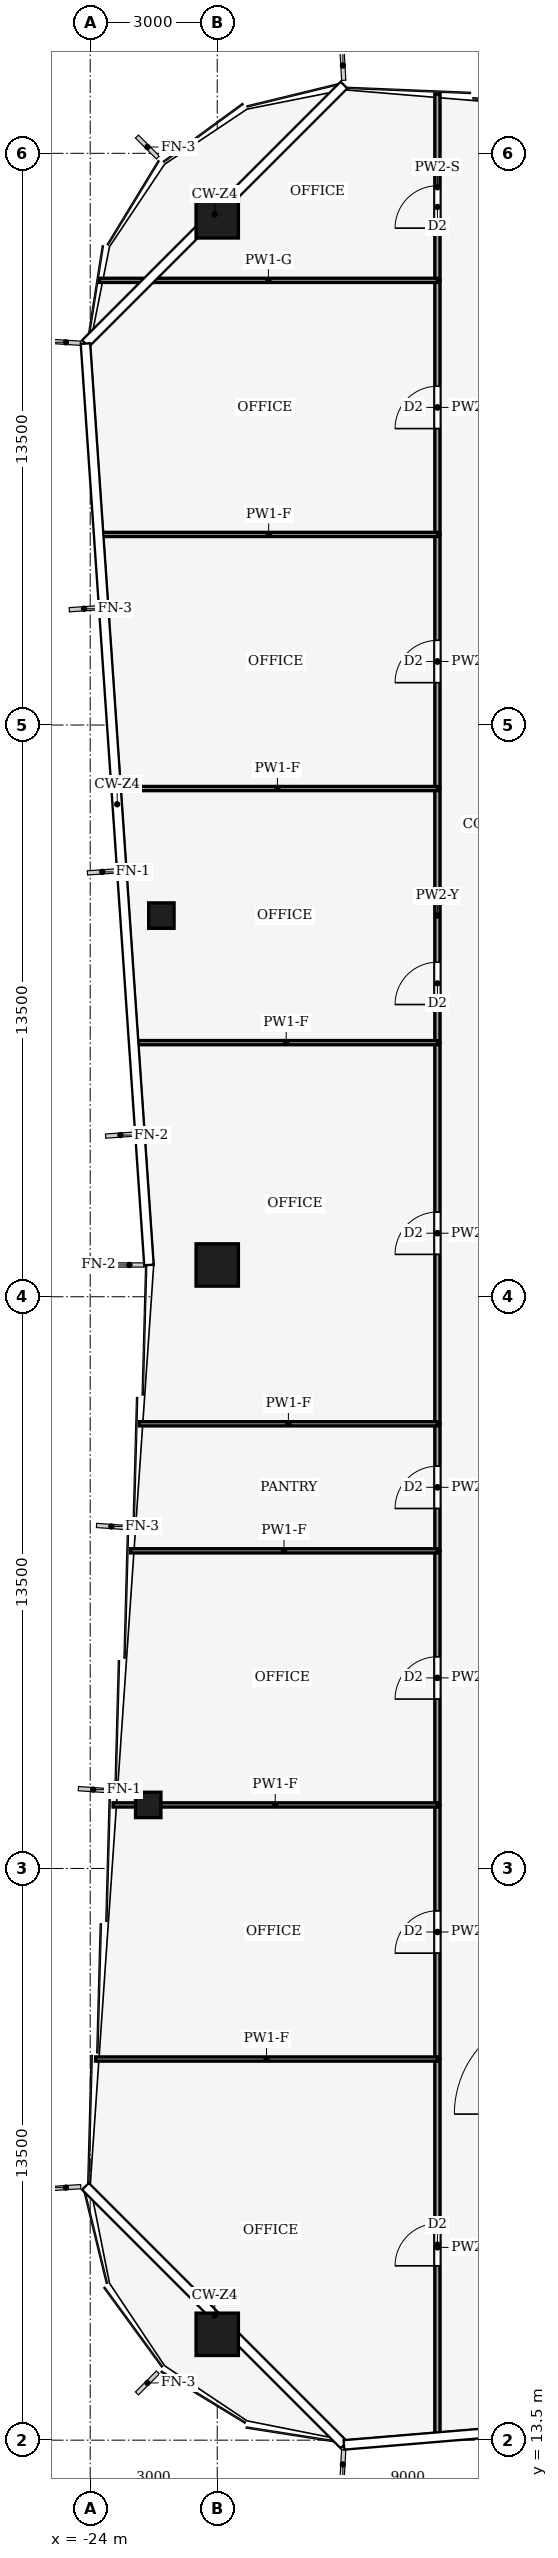
"""IFC4 building model, lengths in metres.
Left out: names, types, materials, properties, quantities, classifications, styles, units other than length and angle.
Written with IfcOpenShell. Run it as: python <this file> out.ifc"""

import sys

from ifc_helpers import new_model, si_unit, direction, frame, frame_2d, origin, origin_2d, place, context, subcontext, project, spatial, rectangle, hollow_rectangle, extrude, element, fill, save


model = new_model("IFC4")
c1 = context("Model", 3, precision=1e-05, world=origin(), true_north=direction((0.0, 1.0)))
c2 = subcontext(c1, "Body", "Model", "MODEL_VIEW")
j1 = project(units=[si_unit("LENGTHUNIT", "METRE"), si_unit("PLANEANGLEUNIT", "RADIAN")], contexts=[c1])
p1 = place(None, origin())
s1 = spatial("IfcSite", under=j1, at=p1, CompositionType="ELEMENT")
p2 = place(p1, origin())
s2 = spatial("IfcBuilding", under=s1, at=p2, CompositionType="ELEMENT")
p3 = place(p2, frame((0.0, 0.0, 262.0)))
s3 = spatial("IfcBuildingStorey", under=s2, at=p3, CompositionType="ELEMENT", Elevation=262.0)
for number, where, z_axis, x_axis in (
    (1, (-21.0, 66.0, 0.0), (0.0, 0.0, 1.0), (1.0, 0.0, 0.0)),
    (2, (-21.0, 16.0, 0.0), (0.0, 0.0, 1.0), (1.0, 0.0, 0.0)),
    (3, (-21.0, 41.25, 0.0), (0.0, 0.0, 1.0), (1.0, 0.0, 0.0)),
):
    element("IfcColumn", number, at=place(p3, frame(where, z_axis=z_axis, x_axis=x_axis)), inside=s3, PredefinedType="COLUMN", context=c2, shape_type="SweptSolid", body=[
        extrude(hollow_rectangle(XDim=1.0, YDim=1.0, WallThickness=0.045, at=origin_2d()), origin(), (0.0, 0.0, 1.0), 4.0),
    ])
for number, where, z_axis, x_axis in (
    (4, (-22.629, 28.5, 0.0), (0.0, 0.0, 1.0), (1.0, 0.0, 0.0)),
    (5, (-22.319, 49.5, 0.0), (0.0, 0.0, 1.0), (1.0, 0.0, 0.0)),
):
    element("IfcColumn", number, at=place(p3, frame(where, z_axis=z_axis, x_axis=x_axis)), inside=s3, PredefinedType="COLUMN", context=c2, shape_type="SweptSolid", body=[
        extrude(hollow_rectangle(XDim=0.6, YDim=0.6, WallThickness=0.025, at=origin_2d()), origin(), (0.0, 0.0, 1.0), 4.0),
    ])
p4 = place(p3, frame((-15.8, 13.603, 0.0), z_axis=(0.0, 0.0, 1.0), x_axis=(0.0, 1.0, 0.0)))
e6 = element("IfcWall", 6, at=p4, inside=s3, PredefinedType="PARTITIONING", context=c2, shape_type="SweptSolid", body=[
    extrude(rectangle(XDim=8.897, YDim=0.125, at=frame_2d((4.448, 0.0))), origin(), (0.0, 0.0, 1.0), 3.04),
])
p5 = place(p4, frame((4.013, 0.0, 0.0)))
e7 = element("IfcOpeningElement", 7, at=p5, cuts=e6, PredefinedType="OPENING", context=c2, shape_type="SweptSolid", body=[
    extrude(rectangle(XDim=1.0, YDim=2.1, at=frame_2d((0.5, 1.05))), frame((0.0, 0.073, 0.0), z_axis=(0.0, -1.0, 0.0), x_axis=(1.0, 0.0, 0.0)), (0.0, 0.0, 1.0), 0.145),
])
p6 = place(p3, frame((-15.8, 22.5, 0.0), z_axis=(0.0, 0.0, 1.0), x_axis=(0.0, 1.0, 0.0)))
e8 = element("IfcWall", 8, at=p6, inside=s3, PredefinedType="PARTITIONING", context=c2, shape_type="SweptSolid", body=[
    extrude(rectangle(XDim=6.0, YDim=0.125, at=frame_2d((3.0, 0.0))), origin(), (0.0, 0.0, 1.0), 3.44),
])
p7 = place(p6, frame((2.5, 0.0, 0.0)))
e9 = element("IfcOpeningElement", 9, at=p7, cuts=e8, PredefinedType="OPENING", context=c2, shape_type="SweptSolid", body=[
    extrude(rectangle(XDim=1.0, YDim=2.1, at=frame_2d((0.5, 1.05))), frame((0.0, 0.073, 0.0), z_axis=(0.0, -1.0, 0.0), x_axis=(1.0, 0.0, 0.0)), (0.0, 0.0, 1.0), 0.145),
])
p8 = place(p3, frame((-15.8, 28.5, 0.0), z_axis=(0.0, 0.0, 1.0), x_axis=(0.0, 1.0, 0.0)))
e10 = element("IfcWall", 10, at=p8, inside=s3, PredefinedType="PARTITIONING", context=c2, shape_type="SweptSolid", body=[
    extrude(rectangle(XDim=6.0, YDim=0.125, at=frame_2d((3.0, 0.0))), origin(), (0.0, 0.0, 1.0), 3.48),
])
p9 = place(p8, frame((2.5, 0.0, 0.0)))
e11 = element("IfcOpeningElement", 11, at=p9, cuts=e10, PredefinedType="OPENING", context=c2, shape_type="SweptSolid", body=[
    extrude(rectangle(XDim=1.0, YDim=2.1, at=frame_2d((0.5, 1.05))), frame((0.0, 0.073, 0.0), z_axis=(0.0, -1.0, 0.0), x_axis=(1.0, 0.0, 0.0)), (0.0, 0.0, 1.0), 0.145),
])
p10 = place(p3, frame((-15.8, 34.5, 0.0), z_axis=(0.0, 0.0, 1.0), x_axis=(0.0, 1.0, 0.0)))
e12 = element("IfcWall", 12, at=p10, inside=s3, PredefinedType="PARTITIONING", context=c2, shape_type="SweptSolid", body=[
    extrude(rectangle(XDim=3.0, YDim=0.125, at=frame_2d((1.5, 0.0))), origin(), (0.0, 0.0, 1.0), 3.48),
])
p11 = place(p10, frame((1.0, 0.0, 0.0)))
e13 = element("IfcOpeningElement", 13, at=p11, cuts=e12, PredefinedType="OPENING", context=c2, shape_type="SweptSolid", body=[
    extrude(rectangle(XDim=1.0, YDim=2.1, at=frame_2d((0.5, 1.05))), frame((0.0, 0.073, 0.0), z_axis=(0.0, -1.0, 0.0), x_axis=(1.0, 0.0, 0.0)), (0.0, 0.0, 1.0), 0.145),
])
p12 = place(p3, frame((-15.8, 37.5, 0.0), z_axis=(0.0, 0.0, 1.0), x_axis=(0.0, 1.0, 0.0)))
e14 = element("IfcWall", 14, at=p12, inside=s3, PredefinedType="PARTITIONING", context=c2, shape_type="SweptSolid", body=[
    extrude(rectangle(XDim=9.0, YDim=0.125, at=frame_2d((4.5, 0.0))), origin(), (0.0, 0.0, 1.0), 3.14),
])
p13 = place(p12, frame((4.0, 0.0, 0.0)))
e15 = element("IfcOpeningElement", 15, at=p13, cuts=e14, PredefinedType="OPENING", context=c2, shape_type="SweptSolid", body=[
    extrude(rectangle(XDim=1.0, YDim=2.1, at=frame_2d((0.5, 1.05))), frame((0.0, 0.073, 0.0), z_axis=(0.0, -1.0, 0.0), x_axis=(1.0, 0.0, 0.0)), (0.0, 0.0, 1.0), 0.145),
])
p14 = place(p3, frame((-15.8, 46.5, 0.0), z_axis=(0.0, 0.0, 1.0), x_axis=(0.0, 1.0, 0.0)))
e16 = element("IfcWall", 16, at=p14, inside=s3, PredefinedType="PARTITIONING", context=c2, shape_type="SweptSolid", body=[
    extrude(rectangle(XDim=6.0, YDim=0.125, at=frame_2d((3.0, 0.0))), origin(), (0.0, 0.0, 1.0), 3.24),
])
p15 = place(p14, frame((0.9, 0.0, 0.0)))
e17 = element("IfcOpeningElement", 17, at=p15, cuts=e16, PredefinedType="OPENING", context=c2, shape_type="SweptSolid", body=[
    extrude(rectangle(XDim=1.0, YDim=2.1, at=frame_2d((0.5, 1.05))), frame((0.0, 0.073, 0.0), z_axis=(0.0, -1.0, 0.0), x_axis=(1.0, 0.0, 0.0)), (0.0, 0.0, 1.0), 0.145),
])
p16 = place(p3, frame((-15.8, 52.5, 0.0), z_axis=(0.0, 0.0, 1.0), x_axis=(0.0, 1.0, 0.0)))
e18 = element("IfcWall", 18, at=p16, inside=s3, PredefinedType="PARTITIONING", context=c2, shape_type="SweptSolid", body=[
    extrude(rectangle(XDim=6.0, YDim=0.125, at=frame_2d((3.0, 0.0))), origin(), (0.0, 0.0, 1.0), 3.87),
])
p17 = place(p16, frame((2.5, 0.0, 0.0)))
e19 = element("IfcOpeningElement", 19, at=p17, cuts=e18, PredefinedType="OPENING", context=c2, shape_type="SweptSolid", body=[
    extrude(rectangle(XDim=1.0, YDim=2.1, at=frame_2d((0.5, 1.05))), frame((0.0, 0.073, 0.0), z_axis=(0.0, -1.0, 0.0), x_axis=(1.0, 0.0, 0.0)), (0.0, 0.0, 1.0), 0.145),
])
p18 = place(p3, frame((-15.8, 58.5, 0.0), z_axis=(0.0, 0.0, 1.0), x_axis=(0.0, 1.0, 0.0)))
e20 = element("IfcWall", 20, at=p18, inside=s3, PredefinedType="PARTITIONING", context=c2, shape_type="SweptSolid", body=[
    extrude(rectangle(XDim=6.0, YDim=0.125, at=frame_2d((3.0, 0.0))), origin(), (0.0, 0.0, 1.0), 3.87),
])
p19 = place(p18, frame((2.5, 0.0, 0.0)))
e21 = element("IfcOpeningElement", 21, at=p19, cuts=e20, PredefinedType="OPENING", context=c2, shape_type="SweptSolid", body=[
    extrude(rectangle(XDim=1.0, YDim=2.1, at=frame_2d((0.5, 1.05))), frame((0.0, 0.073, 0.0), z_axis=(0.0, -1.0, 0.0), x_axis=(1.0, 0.0, 0.0)), (0.0, 0.0, 1.0), 0.145),
])
p20 = place(p3, frame((-15.8, 64.5, 0.0), z_axis=(0.0, 0.0, 1.0), x_axis=(0.0, 1.0, 0.0)))
e22 = element("IfcWall", 22, at=p20, inside=s3, PredefinedType="PARTITIONING", context=c2, shape_type="SweptSolid", body=[
    extrude(rectangle(XDim=4.397, YDim=0.125, at=frame_2d((2.198, 0.0))), origin(), (0.0, 0.0, 1.0), 3.04),
])
p21 = place(p20, frame((1.233, 0.0, 0.0)))
e23 = element("IfcOpeningElement", 23, at=p21, cuts=e22, PredefinedType="OPENING", context=c2, shape_type="SweptSolid", body=[
    extrude(rectangle(XDim=1.0, YDim=2.1, at=frame_2d((0.5, 1.05))), frame((0.0, 0.073, 0.0), z_axis=(0.0, -1.0, 0.0), x_axis=(1.0, 0.0, 0.0)), (0.0, 0.0, 1.0), 0.145),
])
p22 = place(p3, frame((-15.8, 22.5, 0.0), z_axis=(0.0, 0.0, 1.0), x_axis=(-1.0, 0.0, 0.0)))
e24 = element("IfcWall", 24, at=p22, inside=s3, PredefinedType="PARTITIONING", context=c2, shape_type="SweptSolid", body=[
    extrude(rectangle(XDim=8.073, YDim=0.1, at=frame_2d((4.037, 0.0))), origin(), (0.0, 0.0, 1.0), 3.04),
])
p23 = place(p3, frame((-15.8, 28.5, 0.0), z_axis=(0.0, 0.0, 1.0), x_axis=(-1.0, 0.0, 0.0)))
e25 = element("IfcWall", 25, at=p23, inside=s3, PredefinedType="PARTITIONING", context=c2, shape_type="SweptSolid", body=[
    extrude(rectangle(XDim=7.659, YDim=0.1, at=frame_2d((3.83, 0.0))), origin(), (0.0, 0.0, 1.0), 3.04),
])
p24 = place(p3, frame((-15.8, 34.5, 0.0), z_axis=(0.0, 0.0, 1.0), x_axis=(-1.0, 0.0, 0.0)))
e26 = element("IfcWall", 26, at=p24, inside=s3, PredefinedType="PARTITIONING", context=c2, shape_type="SweptSolid", body=[
    extrude(rectangle(XDim=7.245, YDim=0.1, at=frame_2d((3.623, 0.0))), origin(), (0.0, 0.0, 1.0), 3.04),
])
p25 = place(p3, frame((-15.8, 37.5, 0.0), z_axis=(0.0, 0.0, 1.0), x_axis=(-1.0, 0.0, 0.0)))
e27 = element("IfcWall", 27, at=p25, inside=s3, PredefinedType="PARTITIONING", context=c2, shape_type="SweptSolid", body=[
    extrude(rectangle(XDim=7.039, YDim=0.1, at=frame_2d((3.519, 0.0))), origin(), (0.0, 0.0, 1.0), 3.04),
])
p26 = place(p3, frame((-15.8, 46.5, 0.0), z_axis=(0.0, 0.0, 1.0), x_axis=(-1.0, 0.0, 0.0)))
e28 = element("IfcWall", 28, at=p26, inside=s3, PredefinedType="PARTITIONING", context=c2, shape_type="SweptSolid", body=[
    extrude(rectangle(XDim=7.142, YDim=0.1, at=frame_2d((3.571, 0.0))), origin(), (0.0, 0.0, 1.0), 3.04),
])
p27 = place(p3, frame((-15.8, 52.5, 0.0), z_axis=(0.0, 0.0, 1.0), x_axis=(-1.0, 0.0, 0.0)))
e29 = element("IfcWall", 29, at=p27, inside=s3, PredefinedType="PARTITIONING", context=c2, shape_type="SweptSolid", body=[
    extrude(rectangle(XDim=7.556, YDim=0.1, at=frame_2d((3.778, 0.0))), origin(), (0.0, 0.0, 1.0), 3.04),
])
p28 = place(p3, frame((-15.8, 58.5, 0.0), z_axis=(0.0, 0.0, 1.0), x_axis=(-1.0, 0.0, 0.0)))
e30 = element("IfcWall", 30, at=p28, inside=s3, PredefinedType="PARTITIONING", context=c2, shape_type="SweptSolid", body=[
    extrude(rectangle(XDim=7.97, YDim=0.1, at=frame_2d((3.985, 0.0))), origin(), (0.0, 0.0, 1.0), 3.04),
])
p29 = place(p3, frame((-15.8, 64.5, 0.0), z_axis=(0.0, 0.0, 1.0), x_axis=(-1.0, 0.0, 0.0)))
e31 = element("IfcWall", 31, at=p29, inside=s3, PredefinedType="PARTITIONING", context=c2, shape_type="SweptSolid", body=[
    extrude(rectangle(XDim=7.981, YDim=0.1, at=frame_2d((3.991, 0.0))), origin(), (0.0, 0.0, 1.0), 2.93),
])
p30 = place(p5, origin())
e32 = element("IfcDoor", 32, at=p30, inside=s3, OperationType="SINGLE_SWING_RIGHT", PredefinedType="DOOR", context=c2, shape_type="SweptSolid", body=[
    extrude(rectangle(XDim=1.0, YDim=2.1, at=frame_2d((0.5, 1.05))), frame((0.0, 0.025, 0.0), z_axis=(0.0, -1.0, 0.0), x_axis=(1.0, 0.0, 0.0)), (0.0, 0.0, 1.0), 0.05),
])
fill(e7, e32)
p31 = place(p7, origin())
e33 = element("IfcDoor", 33, at=p31, inside=s3, OperationType="SINGLE_SWING_RIGHT", PredefinedType="DOOR", context=c2, shape_type="SweptSolid", body=[
    extrude(rectangle(XDim=1.0, YDim=2.1, at=frame_2d((0.5, 1.05))), frame((0.0, 0.025, 0.0), z_axis=(0.0, -1.0, 0.0), x_axis=(1.0, 0.0, 0.0)), (0.0, 0.0, 1.0), 0.05),
])
fill(e9, e33)
p32 = place(p9, origin())
e34 = element("IfcDoor", 34, at=p32, inside=s3, OperationType="SINGLE_SWING_LEFT", PredefinedType="DOOR", context=c2, shape_type="SweptSolid", body=[
    extrude(rectangle(XDim=1.0, YDim=2.1, at=frame_2d((0.5, 1.05))), frame((0.0, 0.025, 0.0), z_axis=(0.0, -1.0, 0.0), x_axis=(1.0, 0.0, 0.0)), (0.0, 0.0, 1.0), 0.05),
])
fill(e11, e34)
p33 = place(p11, origin())
e35 = element("IfcDoor", 35, at=p33, inside=s3, OperationType="SINGLE_SWING_RIGHT", PredefinedType="DOOR", context=c2, shape_type="SweptSolid", body=[
    extrude(rectangle(XDim=1.0, YDim=2.1, at=frame_2d((0.5, 1.05))), frame((0.0, 0.025, 0.0), z_axis=(0.0, -1.0, 0.0), x_axis=(1.0, 0.0, 0.0)), (0.0, 0.0, 1.0), 0.05),
])
fill(e13, e35)
p34 = place(p13, origin())
e36 = element("IfcDoor", 36, at=p34, inside=s3, OperationType="SINGLE_SWING_LEFT", PredefinedType="DOOR", context=c2, shape_type="SweptSolid", body=[
    extrude(rectangle(XDim=1.0, YDim=2.1, at=frame_2d((0.5, 1.05))), frame((0.0, 0.025, 0.0), z_axis=(0.0, -1.0, 0.0), x_axis=(1.0, 0.0, 0.0)), (0.0, 0.0, 1.0), 0.05),
])
fill(e15, e36)
p35 = place(p15, origin())
e37 = element("IfcDoor", 37, at=p35, inside=s3, OperationType="SINGLE_SWING_LEFT", PredefinedType="DOOR", context=c2, shape_type="SweptSolid", body=[
    extrude(rectangle(XDim=1.0, YDim=2.1, at=frame_2d((0.5, 1.05))), frame((0.0, 0.025, 0.0), z_axis=(0.0, -1.0, 0.0), x_axis=(1.0, 0.0, 0.0)), (0.0, 0.0, 1.0), 0.05),
])
fill(e17, e37)
p36 = place(p17, origin())
e38 = element("IfcDoor", 38, at=p36, inside=s3, OperationType="SINGLE_SWING_LEFT", PredefinedType="DOOR", context=c2, shape_type="SweptSolid", body=[
    extrude(rectangle(XDim=1.0, YDim=2.1, at=frame_2d((0.5, 1.05))), frame((0.0, 0.025, 0.0), z_axis=(0.0, -1.0, 0.0), x_axis=(1.0, 0.0, 0.0)), (0.0, 0.0, 1.0), 0.05),
])
fill(e19, e38)
p37 = place(p19, origin())
e39 = element("IfcDoor", 39, at=p37, inside=s3, OperationType="SINGLE_SWING_RIGHT", PredefinedType="DOOR", context=c2, shape_type="SweptSolid", body=[
    extrude(rectangle(XDim=1.0, YDim=2.1, at=frame_2d((0.5, 1.05))), frame((0.0, 0.025, 0.0), z_axis=(0.0, -1.0, 0.0), x_axis=(1.0, 0.0, 0.0)), (0.0, 0.0, 1.0), 0.05),
])
fill(e21, e39)
p38 = place(p21, origin())
e40 = element("IfcDoor", 40, at=p38, inside=s3, OperationType="SINGLE_SWING_LEFT", PredefinedType="DOOR", context=c2, shape_type="SweptSolid", body=[
    extrude(rectangle(XDim=1.0, YDim=2.1, at=frame_2d((0.5, 1.05))), frame((0.0, 0.025, 0.0), z_axis=(0.0, -1.0, 0.0), x_axis=(1.0, 0.0, 0.0)), (0.0, 0.0, 1.0), 0.05),
])
fill(e23, e40)
save(model, sys.argv[1])
